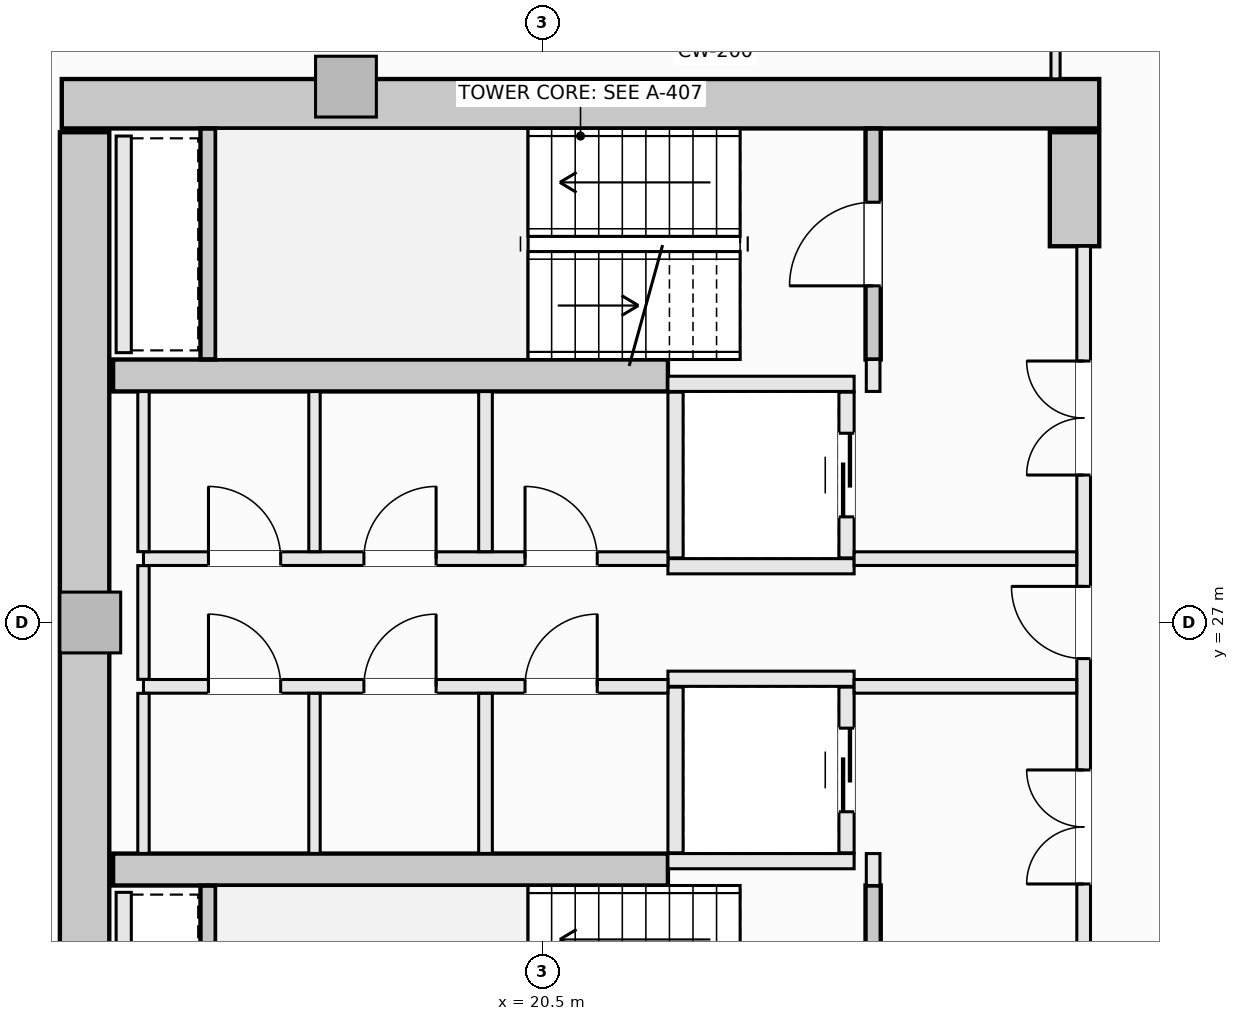
"""IFC4 building model, lengths in metres.
Left out: names, types, materials, properties, quantities, classifications, styles, units other than length and angle.
Written with IfcOpenShell. Run it as: python <this file> out.ifc"""

import sys

from ifc_helpers import new_model, si_unit, direction, frame, frame_2d, origin, origin_2d, place, context, subcontext, project, spatial, rectangle, extrude, element, fill, save


model = new_model("IFC4")
c1 = context("Model", 3, precision=1e-05, world=origin(), true_north=direction((0.0, 1.0)))
c2 = subcontext(c1, "Body", "Model", "MODEL_VIEW")
j1 = project(units=[si_unit("LENGTHUNIT", "METRE"), si_unit("PLANEANGLEUNIT", "RADIAN")], contexts=[c1])
p1 = place(None, origin())
s1 = spatial("IfcSite", under=j1, at=p1, CompositionType="ELEMENT")
p2 = place(p1, origin())
s2 = spatial("IfcBuilding", under=s1, at=p2, CompositionType="ELEMENT")
p3 = place(p2, frame((0.0, 0.0, 139.3)))
s3 = spatial("IfcBuildingStorey", under=s2, at=p3, CompositionType="ELEMENT", Elevation=139.3)
p4 = place(p3, frame((14.175, 33.825, -0.27), z_axis=(0.0, 0.0, 1.0), x_axis=(1.0, 0.0, 0.0)))
e1 = element("IfcWall", 1, at=p4, inside=s3, PredefinedType="SHEAR", context=c2, shape_type="SweptSolid", body=[
    extrude(rectangle(XDim=13.65, YDim=0.65, at=frame_2d((6.825, 0.0))), origin(), (0.0, 0.0, 1.0), 3.4),
])
p5 = place(p3, frame((14.475, 20.55, -0.27), z_axis=(0.0, 0.0, 1.0), x_axis=(0.0, 1.0, 0.0)))
e2 = element("IfcWall", 2, at=p5, inside=s3, PredefinedType="SHEAR", context=c2, shape_type="SweptSolid", body=[
    extrude(rectangle(XDim=12.9, YDim=0.65, at=frame_2d((6.45, 0.0))), origin(), (0.0, 0.0, 1.0), 3.4),
])
p6 = place(p3, frame((27.5, 31.95, -0.27), z_axis=(0.0, 0.0, 1.0), x_axis=(0.0, 1.0, 0.0)))
e3 = element("IfcWall", 3, at=p6, inside=s3, PredefinedType="SHEAR", context=c2, shape_type="SweptSolid", body=[
    extrude(rectangle(XDim=1.5, YDim=0.65, at=frame_2d((0.75, 0.0))), origin(), (0.0, 0.0, 1.0), 3.4),
])
for number, where, z_axis, x_axis in (
    (4, (14.85, 30.25, -0.27), (0.0, 0.0, 1.0), (1.0, 0.0, 0.0)),
    (5, (14.85, 23.75, -0.27), (0.0, 0.0, 1.0), (1.0, 0.0, 0.0)),
):
    element("IfcWall", number, at=place(p3, frame(where, z_axis=z_axis, x_axis=x_axis)), inside=s3, PredefinedType="SHEAR", context=c2, shape_type="SweptSolid", body=[
        extrude(rectangle(XDim=7.3, YDim=0.42, at=frame_2d((3.65, 0.0))), origin(), (0.0, 0.0, 1.0), 3.4),
    ])
for number, where, z_axis, x_axis in (
    (6, (17.914, 34.05, -0.27), (0.0, 0.0, 1.0), (1.0, 0.0, 0.0)),
    (7, (14.55, 27.0, -0.27), (0.0, 0.0, 1.0), (1.0, 0.0, 0.0)),
):
    element("IfcColumn", number, at=place(p3, frame(where, z_axis=z_axis, x_axis=x_axis)), inside=s3, PredefinedType="PILASTER", context=c2, shape_type="SweptSolid", body=[
        extrude(rectangle(XDim=0.8, YDim=0.8, at=origin_2d()), origin(), (0.0, 0.0, 1.0), 3.4),
    ])
p7 = place(p3, frame((24.85, 30.46, -0.27), z_axis=(0.0, 0.0, 1.0), x_axis=(0.0, 1.0, 0.0)))
e8 = element("IfcWall", 8, at=p7, inside=s3, PredefinedType="SHEAR", context=c2, shape_type="SweptSolid", body=[
    extrude(rectangle(XDim=3.038, YDim=0.2, at=frame_2d((1.519, 0.0))), origin(), (0.0, 0.0, 1.0), 3.4),
])
p8 = place(p7, frame((0.969, 0.0, 0.27)))
e9 = element("IfcOpeningElement", 9, at=p8, cuts=e8, PredefinedType="OPENING", context=c2, shape_type="SweptSolid", body=[
    extrude(rectangle(XDim=1.1, YDim=2.15, at=frame_2d((0.55, 1.075))), frame((0.0, 0.11, 0.0), z_axis=(0.0, -1.0, 0.0), x_axis=(1.0, 0.0, 0.0)), (0.0, 0.0, 1.0), 0.22),
])
p9 = place(p3, frame((16.1, 30.462, -0.27), z_axis=(0.0, 0.0, 1.0), x_axis=(0.0, 1.0, 0.0)))
e10 = element("IfcWall", 10, at=p9, inside=s3, PredefinedType="SHEAR", context=c2, shape_type="SweptSolid", body=[
    extrude(rectangle(XDim=3.036, YDim=0.2, at=frame_2d((1.518, 0.0))), origin(), (0.0, 0.0, 1.0), 3.4),
])
p10 = place(p3, frame((24.85, 20.502, -0.27), z_axis=(0.0, 0.0, 1.0), x_axis=(0.0, 1.0, 0.0)))
e11 = element("IfcWall", 11, at=p10, inside=s3, PredefinedType="SHEAR", context=c2, shape_type="SweptSolid", body=[
    extrude(rectangle(XDim=3.038, YDim=0.2, at=frame_2d((1.519, 0.0))), origin(), (0.0, 0.0, 1.0), 3.4),
])
p11 = place(p10, frame((0.969, 0.0, 0.27)))
e12 = element("IfcOpeningElement", 12, at=p11, cuts=e11, PredefinedType="OPENING", context=c2, shape_type="SweptSolid", body=[
    extrude(rectangle(XDim=1.1, YDim=2.15, at=frame_2d((0.55, 1.075))), frame((0.0, 0.11, 0.0), z_axis=(0.0, -1.0, 0.0), x_axis=(1.0, 0.0, 0.0)), (0.0, 0.0, 1.0), 0.22),
])
p12 = place(p3, frame((16.1, 20.502, -0.27), z_axis=(0.0, 0.0, 1.0), x_axis=(0.0, 1.0, 0.0)))
e13 = element("IfcWall", 13, at=p12, inside=s3, PredefinedType="SHEAR", context=c2, shape_type="SweptSolid", body=[
    extrude(rectangle(XDim=3.036, YDim=0.2, at=frame_2d((1.518, 0.0))), origin(), (0.0, 0.0, 1.0), 3.4),
])
for number, where, z_axis, x_axis in (
    (14, (22.15, 30.14, 0.0), (0.0, 0.0, 1.0), (1.0, 0.0, 0.0)),
    (15, (22.15, 27.74, 0.0), (0.0, 0.0, 1.0), (1.0, 0.0, 0.0)),
):
    element("IfcWall", number, at=place(p3, frame(where, z_axis=z_axis, x_axis=x_axis)), inside=s3, PredefinedType="SOLIDWALL", context=c2, shape_type="SweptSolid", body=[
        extrude(rectangle(XDim=2.45, YDim=0.2, at=frame_2d((1.225, 0.0))), origin(), (0.0, 0.0, 1.0), 3.13),
    ])
p13 = place(p3, frame((22.25, 27.85, 0.0), z_axis=(0.0, 0.0, 1.0), x_axis=(0.0, 1.0, 0.0)))
e16 = element("IfcWall", 16, at=p13, inside=s3, PredefinedType="SOLIDWALL", context=c2, shape_type="SweptSolid", body=[
    extrude(rectangle(XDim=2.18, YDim=0.2, at=frame_2d((1.09, 0.0))), origin(), (0.0, 0.0, 1.0), 3.13),
])
p14 = place(p3, frame((24.5, 27.85, 0.0), z_axis=(0.0, 0.0, 1.0), x_axis=(0.0, 1.0, 0.0)))
e17 = element("IfcWall", 17, at=p14, inside=s3, PredefinedType="SOLIDWALL", context=c2, shape_type="SweptSolid", body=[
    extrude(rectangle(XDim=2.18, YDim=0.2, at=frame_2d((1.09, 0.0))), origin(), (0.0, 0.0, 1.0), 3.13),
])
p15 = place(p14, frame((0.54, 0.0, 0.0)))
e18 = element("IfcOpeningElement", 18, at=p15, cuts=e17, PredefinedType="OPENING", context=c2, shape_type="SweptSolid", body=[
    extrude(rectangle(XDim=1.1, YDim=2.2, at=frame_2d((0.55, 1.1))), frame((0.0, 0.11, 0.0), z_axis=(0.0, -1.0, 0.0), x_axis=(1.0, 0.0, 0.0)), (0.0, 0.0, 1.0), 0.22),
])
for number, where, z_axis, x_axis in (
    (19, (22.15, 26.26, 0.0), (0.0, 0.0, 1.0), (1.0, 0.0, 0.0)),
    (20, (22.15, 23.86, 0.0), (0.0, 0.0, 1.0), (1.0, 0.0, 0.0)),
):
    element("IfcWall", number, at=place(p3, frame(where, z_axis=z_axis, x_axis=x_axis)), inside=s3, PredefinedType="SOLIDWALL", context=c2, shape_type="SweptSolid", body=[
        extrude(rectangle(XDim=2.45, YDim=0.2, at=frame_2d((1.225, 0.0))), origin(), (0.0, 0.0, 1.0), 3.13),
    ])
p16 = place(p3, frame((22.25, 23.97, 0.0), z_axis=(0.0, 0.0, 1.0), x_axis=(0.0, 1.0, 0.0)))
e21 = element("IfcWall", 21, at=p16, inside=s3, PredefinedType="SOLIDWALL", context=c2, shape_type="SweptSolid", body=[
    extrude(rectangle(XDim=2.18, YDim=0.2, at=frame_2d((1.09, 0.0))), origin(), (0.0, 0.0, 1.0), 3.13),
])
p17 = place(p3, frame((24.5, 23.97, 0.0), z_axis=(0.0, 0.0, 1.0), x_axis=(0.0, 1.0, 0.0)))
e22 = element("IfcWall", 22, at=p17, inside=s3, PredefinedType="SOLIDWALL", context=c2, shape_type="SweptSolid", body=[
    extrude(rectangle(XDim=2.18, YDim=0.2, at=frame_2d((1.09, 0.0))), origin(), (0.0, 0.0, 1.0), 3.13),
])
p18 = place(p17, frame((0.54, 0.0, 0.0)))
e23 = element("IfcOpeningElement", 23, at=p18, cuts=e22, PredefinedType="OPENING", context=c2, shape_type="SweptSolid", body=[
    extrude(rectangle(XDim=1.1, YDim=2.2, at=frame_2d((0.55, 1.1))), frame((0.0, 0.11, 0.0), z_axis=(0.0, -1.0, 0.0), x_axis=(1.0, 0.0, 0.0)), (0.0, 0.0, 1.0), 0.22),
])
for number, where, z_axis, x_axis in (
    (24, (14.99, 30.55, 0.0), (0.0, 0.0, 1.0), (0.0, 1.0, 0.0)),
    (25, (14.99, 20.6, 0.0), (0.0, 0.0, 1.0), (0.0, 1.0, 0.0)),
):
    element("IfcWall", number, at=place(p3, frame(where, z_axis=z_axis, x_axis=x_axis)), inside=s3, PredefinedType="SOLIDWALL", context=c2, shape_type="SweptSolid", body=[
        extrude(rectangle(XDim=2.85, YDim=0.2, at=frame_2d((1.425, 0.0))), origin(), (0.0, 0.0, 1.0), 3.13),
    ])
for number, where, z_axis, x_axis in (
    (26, (24.85, 23.54, 0.0), (0.0, 0.0, 1.0), (0.0, 1.0, 0.0)),
    (27, (24.85, 30.04, 0.0), (0.0, 0.0, 1.0), (0.0, 1.0, 0.0)),
):
    element("IfcWall", number, at=place(p3, frame(where, z_axis=z_axis, x_axis=x_axis)), inside=s3, PredefinedType="SOLIDWALL", context=c2, shape_type="SweptSolid", body=[
        extrude(rectangle(XDim=0.42, YDim=0.18, at=frame_2d((0.21, 0.0))), origin(), (0.0, 0.0, 1.0), 3.13),
    ])
p19 = place(p3, frame((27.62, 22.05, 0.0), z_axis=(0.0, 0.0, 1.0), x_axis=(0.0, 1.0, 0.0)))
e28 = element("IfcWall", 28, at=p19, inside=s3, PredefinedType="SOLIDWALL", context=c2, shape_type="SweptSolid", body=[
    extrude(rectangle(XDim=9.9, YDim=0.18, at=frame_2d((4.95, 0.0))), origin(), (0.0, 0.0, 1.0), 3.13),
])
p20 = place(p19, frame((4.475, 0.0, 0.0)))
e29 = element("IfcOpeningElement", 29, at=p20, cuts=e28, PredefinedType="OPENING", context=c2, shape_type="SweptSolid", body=[
    extrude(rectangle(XDim=0.95, YDim=2.1, at=frame_2d((0.475, 1.05))), frame((0.0, 0.1, 0.0), z_axis=(0.0, -1.0, 0.0), x_axis=(1.0, 0.0, 0.0)), (0.0, 0.0, 1.0), 0.2),
])
p21 = place(p19, frame((6.89, 0.0, 0.0)))
e30 = element("IfcOpeningElement", 30, at=p21, cuts=e28, PredefinedType="OPENING", context=c2, shape_type="SweptSolid", body=[
    extrude(rectangle(XDim=1.5, YDim=2.2, at=frame_2d((0.75, 1.1))), frame((0.0, 0.1, 0.0), z_axis=(0.0, -1.0, 0.0), x_axis=(1.0, 0.0, 0.0)), (0.0, 0.0, 1.0), 0.2),
])
p22 = place(p19, frame((1.51, 0.0, 0.0)))
e31 = element("IfcOpeningElement", 31, at=p22, cuts=e28, PredefinedType="OPENING", context=c2, shape_type="SweptSolid", body=[
    extrude(rectangle(XDim=1.5, YDim=2.2, at=frame_2d((0.75, 1.1))), frame((0.0, 0.1, 0.0), z_axis=(0.0, -1.0, 0.0), x_axis=(1.0, 0.0, 0.0)), (0.0, 0.0, 1.0), 0.2),
])
p23 = place(p3, frame((15.25, 27.84, 0.0), z_axis=(0.0, 0.0, 1.0), x_axis=(1.0, 0.0, 0.0)))
e32 = element("IfcWall", 32, at=p23, inside=s3, PredefinedType="SOLIDWALL", context=c2, shape_type="SweptSolid", body=[
    extrude(rectangle(XDim=6.9, YDim=0.18, at=frame_2d((3.45, 0.0))), origin(), (0.0, 0.0, 1.0), 3.13),
])
p24 = place(p23, frame((5.02, 0.0, 0.0)))
e33 = element("IfcOpeningElement", 33, at=p24, cuts=e32, PredefinedType="OPENING", context=c2, shape_type="SweptSolid", body=[
    extrude(rectangle(XDim=0.95, YDim=2.1, at=frame_2d((0.475, 1.05))), frame((0.0, 0.1, 0.0), z_axis=(0.0, -1.0, 0.0), x_axis=(1.0, 0.0, 0.0)), (0.0, 0.0, 1.0), 0.2),
])
p25 = place(p23, frame((0.855, 0.0, 0.0)))
e34 = element("IfcOpeningElement", 34, at=p25, cuts=e32, PredefinedType="OPENING", context=c2, shape_type="SweptSolid", body=[
    extrude(rectangle(XDim=0.95, YDim=2.1, at=frame_2d((0.475, 1.05))), frame((0.0, 0.1, 0.0), z_axis=(0.0, -1.0, 0.0), x_axis=(1.0, 0.0, 0.0)), (0.0, 0.0, 1.0), 0.2),
])
p26 = place(p23, frame((2.9, 0.0, 0.0)))
e35 = element("IfcOpeningElement", 35, at=p26, cuts=e32, PredefinedType="OPENING", context=c2, shape_type="SweptSolid", body=[
    extrude(rectangle(XDim=0.95, YDim=2.1, at=frame_2d((0.475, 1.05))), frame((0.0, 0.1, 0.0), z_axis=(0.0, -1.0, 0.0), x_axis=(1.0, 0.0, 0.0)), (0.0, 0.0, 1.0), 0.2),
])
p27 = place(p3, frame((24.6, 27.84, 0.0), z_axis=(0.0, 0.0, 1.0), x_axis=(1.0, 0.0, 0.0)))
e36 = element("IfcWall", 36, at=p27, inside=s3, PredefinedType="SOLIDWALL", context=c2, shape_type="SweptSolid", body=[
    extrude(rectangle(XDim=2.928, YDim=0.18, at=frame_2d((1.464, 0.0))), origin(), (0.0, 0.0, 1.0), 3.13),
])
p28 = place(p3, frame((15.25, 26.16, 0.0), z_axis=(0.0, 0.0, 1.0), x_axis=(1.0, 0.0, 0.0)))
e37 = element("IfcWall", 37, at=p28, inside=s3, PredefinedType="SOLIDWALL", context=c2, shape_type="SweptSolid", body=[
    extrude(rectangle(XDim=6.9, YDim=0.18, at=frame_2d((3.45, 0.0))), origin(), (0.0, 0.0, 1.0), 3.13),
])
p29 = place(p28, frame((5.02, 0.0, 0.0)))
e38 = element("IfcOpeningElement", 38, at=p29, cuts=e37, PredefinedType="OPENING", context=c2, shape_type="SweptSolid", body=[
    extrude(rectangle(XDim=0.95, YDim=2.1, at=frame_2d((0.475, 1.05))), frame((0.0, 0.1, 0.0), z_axis=(0.0, -1.0, 0.0), x_axis=(1.0, 0.0, 0.0)), (0.0, 0.0, 1.0), 0.2),
])
p30 = place(p28, frame((0.855, 0.0, 0.0)))
e39 = element("IfcOpeningElement", 39, at=p30, cuts=e37, PredefinedType="OPENING", context=c2, shape_type="SweptSolid", body=[
    extrude(rectangle(XDim=0.95, YDim=2.1, at=frame_2d((0.475, 1.05))), frame((0.0, 0.1, 0.0), z_axis=(0.0, -1.0, 0.0), x_axis=(1.0, 0.0, 0.0)), (0.0, 0.0, 1.0), 0.2),
])
p31 = place(p28, frame((2.9, 0.0, 0.0)))
e40 = element("IfcOpeningElement", 40, at=p31, cuts=e37, PredefinedType="OPENING", context=c2, shape_type="SweptSolid", body=[
    extrude(rectangle(XDim=0.95, YDim=2.1, at=frame_2d((0.475, 1.05))), frame((0.0, 0.1, 0.0), z_axis=(0.0, -1.0, 0.0), x_axis=(1.0, 0.0, 0.0)), (0.0, 0.0, 1.0), 0.2),
])
p32 = place(p3, frame((24.6, 26.16, 0.0), z_axis=(0.0, 0.0, 1.0), x_axis=(1.0, 0.0, 0.0)))
e41 = element("IfcWall", 41, at=p32, inside=s3, PredefinedType="SOLIDWALL", context=c2, shape_type="SweptSolid", body=[
    extrude(rectangle(XDim=2.928, YDim=0.18, at=frame_2d((1.464, 0.0))), origin(), (0.0, 0.0, 1.0), 3.13),
])
p33 = place(p3, frame((15.25, 23.962, 0.0), z_axis=(0.0, 0.0, 1.0), x_axis=(0.0, 1.0, 0.0)))
e42 = element("IfcWall", 42, at=p33, inside=s3, PredefinedType="PARTITIONING", context=c2, shape_type="SweptSolid", body=[
    extrude(rectangle(XDim=2.106, YDim=0.15, at=frame_2d((1.053, 0.0))), origin(), (0.0, 0.0, 1.0), 3.13),
])
p34 = place(p3, frame((15.25, 26.252, 0.0), z_axis=(0.0, 0.0, 1.0), x_axis=(0.0, 1.0, 0.0)))
e43 = element("IfcWall", 43, at=p34, inside=s3, PredefinedType="PARTITIONING", context=c2, shape_type="SweptSolid", body=[
    extrude(rectangle(XDim=1.496, YDim=0.15, at=frame_2d((0.748, 0.0))), origin(), (0.0, 0.0, 1.0), 3.13),
])
p35 = place(p3, frame((15.25, 27.932, 0.0), z_axis=(0.0, 0.0, 1.0), x_axis=(0.0, 1.0, 0.0)))
e44 = element("IfcWall", 44, at=p35, inside=s3, PredefinedType="PARTITIONING", context=c2, shape_type="SweptSolid", body=[
    extrude(rectangle(XDim=2.106, YDim=0.15, at=frame_2d((1.053, 0.0))), origin(), (0.0, 0.0, 1.0), 3.13),
])
for number, where, z_axis, x_axis in (
    (45, (19.75, 23.962, 0.0), (0.0, 0.0, 1.0), (0.0, 1.0, 0.0)),
    (46, (19.75, 27.932, 0.0), (0.0, 0.0, 1.0), (0.0, 1.0, 0.0)),
):
    element("IfcWall", number, at=place(p3, frame(where, z_axis=z_axis, x_axis=x_axis)), inside=s3, PredefinedType="SOLIDWALL", context=c2, shape_type="SweptSolid", body=[
        extrude(rectangle(XDim=2.106, YDim=0.18, at=frame_2d((1.053, 0.0))), origin(), (0.0, 0.0, 1.0), 3.13),
    ])
for number, where, z_axis, x_axis in (
    (47, (17.5, 23.962, 0.0), (0.0, 0.0, 1.0), (0.0, 1.0, 0.0)),
    (48, (17.5, 27.932, 0.0), (0.0, 0.0, 1.0), (0.0, 1.0, 0.0)),
):
    element("IfcWall", number, at=place(p3, frame(where, z_axis=z_axis, x_axis=x_axis)), inside=s3, PredefinedType="PARTITIONING", context=c2, shape_type="SweptSolid", body=[
        extrude(rectangle(XDim=2.106, YDim=0.15, at=frame_2d((1.053, 0.0))), origin(), (0.0, 0.0, 1.0), 3.13),
    ])
p36 = place(p3, frame((27.25, 34.152, 0.0), z_axis=(0.0, 0.0, 1.0), x_axis=(0.0, 1.0, 0.0)))
e49 = element("IfcWall", 49, at=p36, inside=s3, PredefinedType="PARTITIONING", context=c2, shape_type="SweptSolid", body=[
    extrude(rectangle(XDim=0.806, YDim=0.12, at=frame_2d((0.403, 0.0))), origin(), (0.0, 0.0, 1.0), 3.13),
])
p37 = place(p8, origin())
e50 = element("IfcDoor", 50, at=p37, inside=s3, OperationType="SINGLE_SWING_LEFT", PredefinedType="DOOR", context=c2, shape_type="SweptSolid", body=[
    extrude(rectangle(XDim=1.1, YDim=2.15, at=frame_2d((0.55, 1.075))), frame((0.0, 0.025, 0.0), z_axis=(0.0, -1.0, 0.0), x_axis=(1.0, 0.0, 0.0)), (0.0, 0.0, 1.0), 0.05),
])
fill(e9, e50)
p38 = place(p15, origin())
e51 = element("IfcDoor", 51, at=p38, inside=s3, OperationType="SLIDING_TO_LEFT", PredefinedType="DOOR", context=c2, shape_type="SweptSolid", body=[
    extrude(rectangle(XDim=1.1, YDim=2.2, at=frame_2d((0.55, 1.1))), frame((0.0, 0.025, 0.0), z_axis=(0.0, -1.0, 0.0), x_axis=(1.0, 0.0, 0.0)), (0.0, 0.0, 1.0), 0.05),
])
fill(e18, e51)
p39 = place(p18, origin())
e52 = element("IfcDoor", 52, at=p39, inside=s3, OperationType="SLIDING_TO_LEFT", PredefinedType="DOOR", context=c2, shape_type="SweptSolid", body=[
    extrude(rectangle(XDim=1.1, YDim=2.2, at=frame_2d((0.55, 1.1))), frame((0.0, 0.025, 0.0), z_axis=(0.0, -1.0, 0.0), x_axis=(1.0, 0.0, 0.0)), (0.0, 0.0, 1.0), 0.05),
])
fill(e23, e52)
p40 = place(p20, origin())
e53 = element("IfcDoor", 53, at=p40, inside=s3, OperationType="SINGLE_SWING_RIGHT", PredefinedType="DOOR", context=c2, shape_type="SweptSolid", body=[
    extrude(rectangle(XDim=0.95, YDim=2.1, at=frame_2d((0.475, 1.05))), frame((0.0, 0.025, 0.0), z_axis=(0.0, -1.0, 0.0), x_axis=(1.0, 0.0, 0.0)), (0.0, 0.0, 1.0), 0.05),
])
fill(e29, e53)
p41 = place(p21, origin())
e54 = element("IfcDoor", 54, at=p41, inside=s3, OperationType="DOUBLE_DOOR_SINGLE_SWING", PredefinedType="DOOR", context=c2, shape_type="SweptSolid", body=[
    extrude(rectangle(XDim=1.5, YDim=2.2, at=frame_2d((0.75, 1.1))), frame((0.0, 0.025, 0.0), z_axis=(0.0, -1.0, 0.0), x_axis=(1.0, 0.0, 0.0)), (0.0, 0.0, 1.0), 0.05),
])
fill(e30, e54)
p42 = place(p22, origin())
e55 = element("IfcDoor", 55, at=p42, inside=s3, OperationType="DOUBLE_DOOR_SINGLE_SWING", PredefinedType="DOOR", context=c2, shape_type="SweptSolid", body=[
    extrude(rectangle(XDim=1.5, YDim=2.2, at=frame_2d((0.75, 1.1))), frame((0.0, 0.025, 0.0), z_axis=(0.0, -1.0, 0.0), x_axis=(1.0, 0.0, 0.0)), (0.0, 0.0, 1.0), 0.05),
])
fill(e31, e55)
p43 = place(p24, origin())
e56 = element("IfcDoor", 56, at=p43, inside=s3, OperationType="SINGLE_SWING_LEFT", PredefinedType="DOOR", context=c2, shape_type="SweptSolid", body=[
    extrude(rectangle(XDim=0.95, YDim=2.1, at=frame_2d((0.475, 1.05))), frame((0.0, 0.025, 0.0), z_axis=(0.0, -1.0, 0.0), x_axis=(1.0, 0.0, 0.0)), (0.0, 0.0, 1.0), 0.05),
])
fill(e33, e56)
p44 = place(p29, origin())
e57 = element("IfcDoor", 57, at=p44, inside=s3, OperationType="SINGLE_SWING_RIGHT", PredefinedType="DOOR", context=c2, shape_type="SweptSolid", body=[
    extrude(rectangle(XDim=0.95, YDim=2.1, at=frame_2d((0.475, 1.05))), frame((0.0, 0.025, 0.0), z_axis=(0.0, -1.0, 0.0), x_axis=(1.0, 0.0, 0.0)), (0.0, 0.0, 1.0), 0.05),
])
fill(e38, e57)
p45 = place(p25, origin())
e58 = element("IfcDoor", 58, at=p45, inside=s3, OperationType="SINGLE_SWING_LEFT", PredefinedType="DOOR", context=c2, shape_type="SweptSolid", body=[
    extrude(rectangle(XDim=0.95, YDim=2.1, at=frame_2d((0.475, 1.05))), frame((0.0, 0.025, 0.0), z_axis=(0.0, -1.0, 0.0), x_axis=(1.0, 0.0, 0.0)), (0.0, 0.0, 1.0), 0.05),
])
fill(e34, e58)
p46 = place(p26, origin())
e59 = element("IfcDoor", 59, at=p46, inside=s3, OperationType="SINGLE_SWING_RIGHT", PredefinedType="DOOR", context=c2, shape_type="SweptSolid", body=[
    extrude(rectangle(XDim=0.95, YDim=2.1, at=frame_2d((0.475, 1.05))), frame((0.0, 0.025, 0.0), z_axis=(0.0, -1.0, 0.0), x_axis=(1.0, 0.0, 0.0)), (0.0, 0.0, 1.0), 0.05),
])
fill(e35, e59)
p47 = place(p30, origin())
e60 = element("IfcDoor", 60, at=p47, inside=s3, OperationType="SINGLE_SWING_LEFT", PredefinedType="DOOR", context=c2, shape_type="SweptSolid", body=[
    extrude(rectangle(XDim=0.95, YDim=2.1, at=frame_2d((0.475, 1.05))), frame((0.0, 0.025, 0.0), z_axis=(0.0, -1.0, 0.0), x_axis=(1.0, 0.0, 0.0)), (0.0, 0.0, 1.0), 0.05),
])
fill(e39, e60)
p48 = place(p31, origin())
e61 = element("IfcDoor", 61, at=p48, inside=s3, OperationType="SINGLE_SWING_RIGHT", PredefinedType="DOOR", context=c2, shape_type="SweptSolid", body=[
    extrude(rectangle(XDim=0.95, YDim=2.1, at=frame_2d((0.475, 1.05))), frame((0.0, 0.025, 0.0), z_axis=(0.0, -1.0, 0.0), x_axis=(1.0, 0.0, 0.0)), (0.0, 0.0, 1.0), 0.05),
])
fill(e40, e61)
save(model, sys.argv[1])
